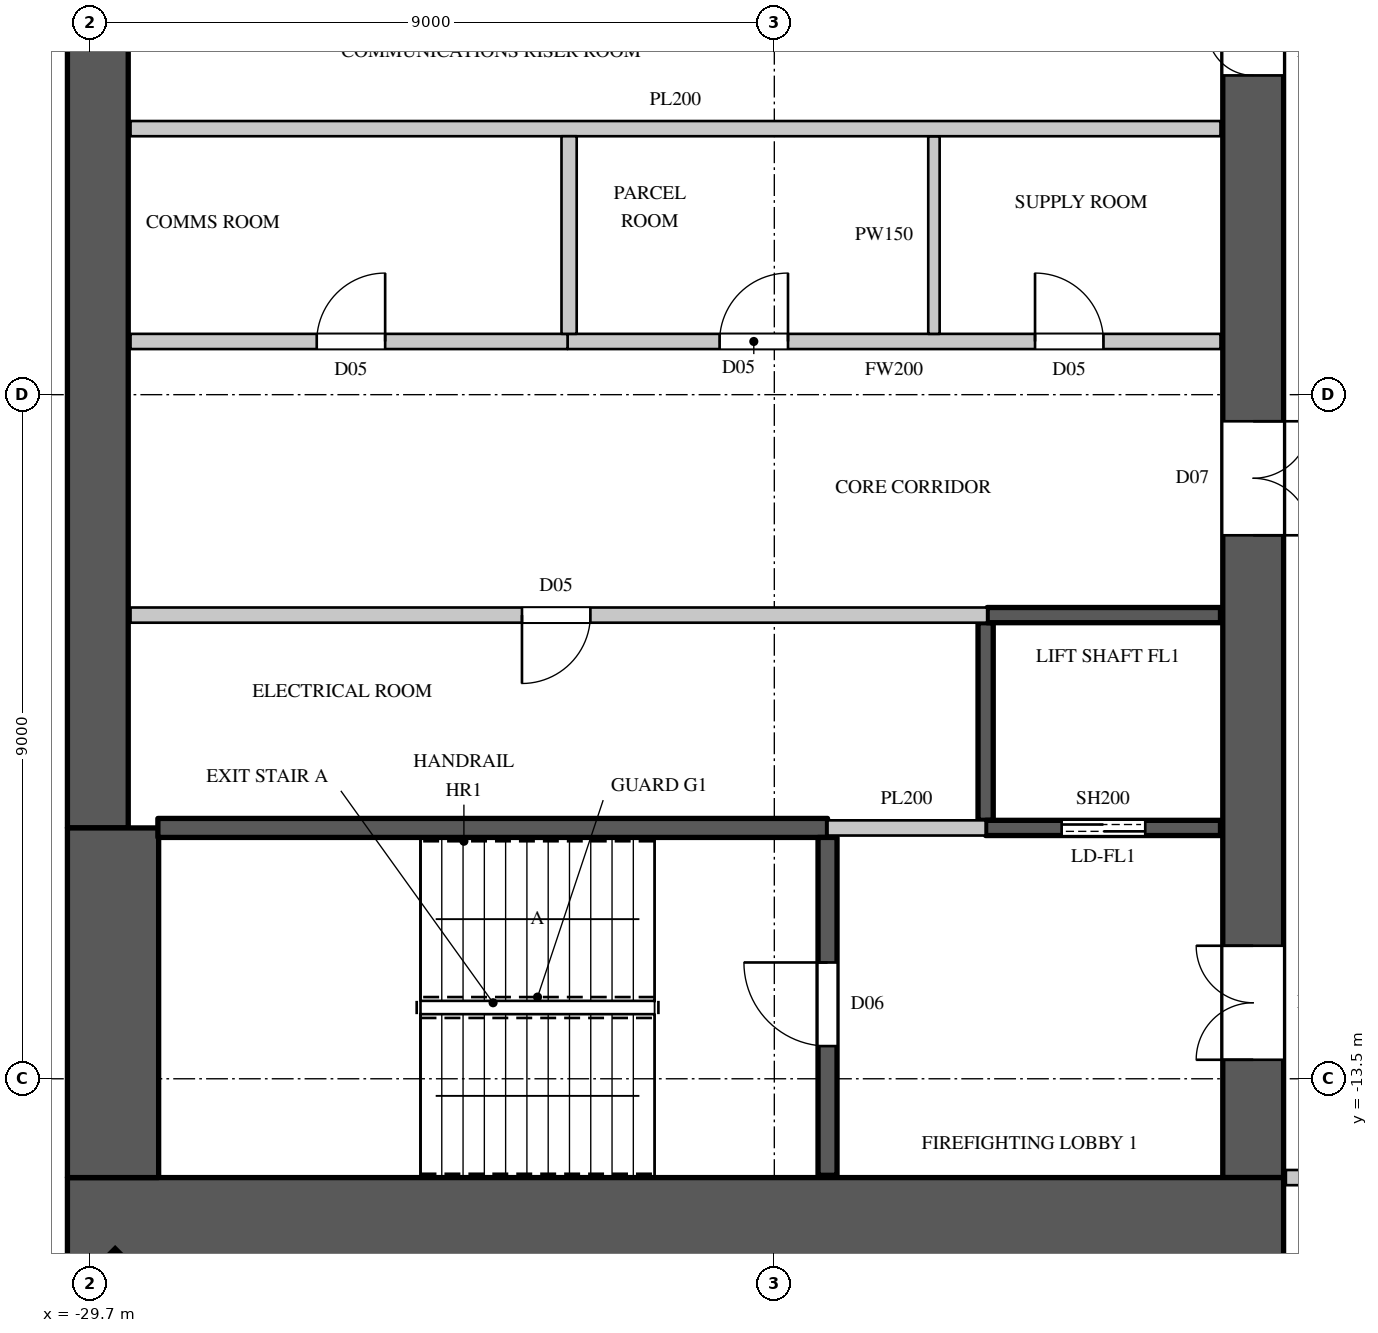
"""IFC4 building model, lengths in metres.
Left out: names, types, materials, properties, quantities, classifications, styles, units other than length and angle.
Written with IfcOpenShell. Run it as: python <this file> out.ifc"""

import sys

from ifc_helpers import new_model, si_unit, direction, frame, frame_2d, origin, origin_2d, place, context, subcontext, project, spatial, rectangle, extrude, element, fill, save


model = new_model("IFC4")
c1 = context("Model", 3, precision=1e-05, world=origin(), true_north=direction((0.0, 1.0)))
c2 = subcontext(c1, "Body", "Model", "MODEL_VIEW")
j1 = project(units=[si_unit("LENGTHUNIT", "METRE"), si_unit("PLANEANGLEUNIT", "RADIAN")], contexts=[c1])
p1 = place(None, origin())
s1 = spatial("IfcSite", under=j1, at=p1, CompositionType="ELEMENT")
p2 = place(p1, origin())
s2 = spatial("IfcBuilding", under=s1, at=p2, CompositionType="ELEMENT")
p3 = place(p2, frame((0.0, 0.0, 201.5)))
s3 = spatial("IfcBuildingStorey", under=s2, at=p3, CompositionType="ELEMENT", Elevation=201.5)
p4 = place(p3, frame((-29.443, -16.443, 0.0), z_axis=(0.0, 0.0, 1.0), x_axis=(0.707106781187, -0.707106781187, 0.0)))
e1 = element("IfcColumn", 1, at=p4, inside=s3, PredefinedType="COLUMN", context=c2, shape_type="SweptSolid", body=[
    extrude(rectangle(XDim=0.9, YDim=1.1, at=origin_2d()), origin(), (0.0, 0.0, 1.0), 4.1),
])
p5 = place(p3, frame((-30.0, -15.4, 0.0), z_axis=(0.0, 0.0, 1.0), x_axis=(1.0, 0.0, 0.0)))
e2 = element("IfcWall", 2, at=p5, inside=s3, PredefinedType="SHEAR", context=c2, shape_type="SweptSolid", body=[
    extrude(rectangle(XDim=16.0, YDim=1.2, at=frame_2d((8.0, 0.0))), origin(), (0.0, 0.0, 1.0), 4.1),
])
p6 = place(p3, frame((-14.4, -14.8, 0.0), z_axis=(0.0, 0.0, 1.0), x_axis=(0.0, 1.0, 0.0)))
e3 = element("IfcWall", 3, at=p6, inside=s3, PredefinedType="SHEAR", context=c2, shape_type="SweptSolid", body=[
    extrude(rectangle(XDim=29.6, YDim=0.8, at=frame_2d((14.8, 0.0))), origin(), (0.0, 0.0, 1.0), 4.1),
])
p7 = place(p6, frame((1.55, 0.0, 0.0)))
e4 = element("IfcOpeningElement", 4, at=p7, cuts=e3, PredefinedType="OPENING", context=c2, shape_type="SweptSolid", body=[
    extrude(rectangle(XDim=1.5, YDim=2.4, at=frame_2d((0.75, 1.2))), frame((0.0, 0.41, 0.0), z_axis=(0.0, -1.0, 0.0), x_axis=(1.0, 0.0, 0.0)), (0.0, 0.0, 1.0), 0.82),
])
p8 = place(p6, frame((26.55, 0.0, 0.0)))
e5 = element("IfcOpeningElement", 5, at=p8, cuts=e3, PredefinedType="OPENING", context=c2, shape_type="SweptSolid", body=[
    extrude(rectangle(XDim=1.5, YDim=2.4, at=frame_2d((0.75, 1.2))), frame((0.0, 0.41, 0.0), z_axis=(0.0, -1.0, 0.0), x_axis=(1.0, 0.0, 0.0)), (0.0, 0.0, 1.0), 0.82),
])
p9 = place(p6, frame((8.45, 0.0, 0.0)))
e6 = element("IfcOpeningElement", 6, at=p9, cuts=e3, PredefinedType="OPENING", context=c2, shape_type="SweptSolid", body=[
    extrude(rectangle(XDim=1.5, YDim=2.4, at=frame_2d((0.75, 1.2))), frame((0.0, 0.41, 0.0), z_axis=(0.0, -1.0, 0.0), x_axis=(1.0, 0.0, 0.0)), (0.0, 0.0, 1.0), 0.82),
])
p10 = place(p6, frame((19.65, 0.0, 0.0)))
e7 = element("IfcOpeningElement", 7, at=p10, cuts=e3, PredefinedType="OPENING", context=c2, shape_type="SweptSolid", body=[
    extrude(rectangle(XDim=1.5, YDim=2.4, at=frame_2d((0.75, 1.2))), frame((0.0, 0.41, 0.0), z_axis=(0.0, -1.0, 0.0), x_axis=(1.0, 0.0, 0.0)), (0.0, 0.0, 1.0), 0.82),
])
p11 = place(p6, frame((14.5, 0.0, 0.0)))
e8 = element("IfcOpeningElement", 8, at=p11, cuts=e3, PredefinedType="OPENING", context=c2, shape_type="SweptSolid", body=[
    extrude(rectangle(XDim=0.6, YDim=2.0, at=frame_2d((0.3, 1.0))), frame((0.0, 0.41, 0.0), z_axis=(0.0, -1.0, 0.0), x_axis=(1.0, 0.0, 0.0)), (0.0, 0.0, 1.0), 0.82),
])
p12 = place(p3, frame((-29.6, -10.2, 0.0), z_axis=(0.0, 0.0, 1.0), x_axis=(0.0, 1.0, 0.0)))
e9 = element("IfcWall", 9, at=p12, inside=s3, PredefinedType="SHEAR", context=c2, shape_type="SweptSolid", body=[
    extrude(rectangle(XDim=20.4, YDim=0.8, at=frame_2d((10.2, 0.0))), origin(), (0.0, 0.0, 1.0), 4.1),
])
p13 = place(p3, frame((-29.4, -14.8, 0.0), z_axis=(0.0, 0.0, 1.0), x_axis=(0.0, 1.0, 0.0)))
e10 = element("IfcWall", 10, at=p13, inside=s3, PredefinedType="SHEAR", context=c2, shape_type="SweptSolid", body=[
    extrude(rectangle(XDim=4.6, YDim=1.2, at=frame_2d((2.3, 0.0))), origin(), (0.0, 0.0, 1.0), 4.1),
])
p14 = place(p3, frame((-23.42, -3.8, 0.0), z_axis=(0.0, 0.0, 1.0), x_axis=(1.0, 0.0, 0.0)))
e11 = element("IfcWall", 11, at=p14, inside=s3, PredefinedType="PARTITIONING", context=c2, shape_type="SweptSolid", body=[
    extrude(rectangle(XDim=8.59, YDim=0.2, at=frame_2d((4.295, 0.0))), origin(), (0.0, 0.0, 1.0), 3.8),
])
p15 = place(p14, frame((2.0, 0.0, 0.0)))
e12 = element("IfcOpeningElement", 12, at=p15, cuts=e11, PredefinedType="OPENING", context=c2, shape_type="SweptSolid", body=[
    extrude(rectangle(XDim=0.9, YDim=2.2, at=frame_2d((0.45, 1.1))), frame((0.0, 0.11, 0.0), z_axis=(0.0, -1.0, 0.0), x_axis=(1.0, 0.0, 0.0)), (0.0, 0.0, 1.0), 0.22),
])
p16 = place(p14, frame((6.15, 0.0, 0.0)))
e13 = element("IfcOpeningElement", 13, at=p16, cuts=e11, PredefinedType="OPENING", context=c2, shape_type="SweptSolid", body=[
    extrude(rectangle(XDim=0.9, YDim=2.2, at=frame_2d((0.45, 1.1))), frame((0.0, 0.11, 0.0), z_axis=(0.0, -1.0, 0.0), x_axis=(1.0, 0.0, 0.0)), (0.0, 0.0, 1.0), 0.22),
])
p17 = place(p3, frame((-13.97, -14.8, 0.0), z_axis=(0.0, 0.0, 1.0), x_axis=(1.0, 0.0, 0.0)))
e14 = element("IfcWall", 14, at=p17, inside=s3, PredefinedType="PARTITIONING", context=c2, shape_type="SweptSolid", body=[
    extrude(rectangle(XDim=2.87, YDim=0.2, at=frame_2d((1.435, 0.0))), origin(), (0.0, 0.0, 1.0), 3.8),
])
p18 = place(p3, frame((-18.6, -3.7, 0.0), z_axis=(0.0, 0.0, 1.0), x_axis=(0.0, 1.0, 0.0)))
e15 = element("IfcWall", 15, at=p18, inside=s3, PredefinedType="PARTITIONING", context=c2, shape_type="SweptSolid", body=[
    extrude(rectangle(XDim=2.6, YDim=0.15, at=frame_2d((1.3, 0.0))), origin(), (0.0, 0.0, 1.0), 3.8),
])
p19 = place(p3, frame((-29.17, -7.4, 0.0), z_axis=(0.0, 0.0, 1.0), x_axis=(1.0, 0.0, 0.0)))
e16 = element("IfcWall", 16, at=p19, inside=s3, PredefinedType="PARTITIONING", context=c2, shape_type="SweptSolid", body=[
    extrude(rectangle(XDim=11.27, YDim=0.2, at=frame_2d((5.635, 0.0))), origin(), (0.0, 0.0, 1.0), 3.8),
])
p20 = place(p19, frame((5.15, 0.0, 0.0)))
e17 = element("IfcOpeningElement", 17, at=p20, cuts=e16, PredefinedType="OPENING", context=c2, shape_type="SweptSolid", body=[
    extrude(rectangle(XDim=0.9, YDim=2.2, at=frame_2d((0.45, 1.1))), frame((0.0, 0.11, 0.0), z_axis=(0.0, -1.0, 0.0), x_axis=(1.0, 0.0, 0.0)), (0.0, 0.0, 1.0), 0.22),
])
p21 = place(p3, frame((-29.17, -3.8, 0.0), z_axis=(0.0, 0.0, 1.0), x_axis=(1.0, 0.0, 0.0)))
e18 = element("IfcWall", 18, at=p21, inside=s3, PredefinedType="PARTITIONING", context=c2, shape_type="SweptSolid", body=[
    extrude(rectangle(XDim=5.75, YDim=0.2, at=frame_2d((2.875, 0.0))), origin(), (0.0, 0.0, 1.0), 3.8),
])
p22 = place(p21, frame((2.45, 0.0, 0.0)))
e19 = element("IfcOpeningElement", 19, at=p22, cuts=e18, PredefinedType="OPENING", context=c2, shape_type="SweptSolid", body=[
    extrude(rectangle(XDim=0.9, YDim=2.2, at=frame_2d((0.45, 1.1))), frame((0.0, 0.11, 0.0), z_axis=(0.0, -1.0, 0.0), x_axis=(1.0, 0.0, 0.0)), (0.0, 0.0, 1.0), 0.22),
])
p23 = place(p3, frame((-29.17, -1.0, 0.0), z_axis=(0.0, 0.0, 1.0), x_axis=(1.0, 0.0, 0.0)))
e20 = element("IfcWall", 20, at=p23, inside=s3, PredefinedType="PARTITIONING", context=c2, shape_type="SweptSolid", body=[
    extrude(rectangle(XDim=14.34, YDim=0.2, at=frame_2d((7.17, 0.0))), origin(), (0.0, 0.0, 1.0), 3.8),
])
p24 = place(p3, frame((-23.4, -3.7, 0.0), z_axis=(0.0, 0.0, 1.0), x_axis=(0.0, 1.0, 0.0)))
e21 = element("IfcWall", 21, at=p24, inside=s3, PredefinedType="PARTITIONING", context=c2, shape_type="SweptSolid", body=[
    extrude(rectangle(XDim=2.6, YDim=0.2, at=frame_2d((1.3, 0.0))), origin(), (0.0, 0.0, 1.0), 3.8),
])
p25 = place(p3, frame((-20.0, -10.2, 0.0), z_axis=(0.0, 0.0, 1.0), x_axis=(1.0, 0.0, 0.0)))
e22 = element("IfcWall", 22, at=p25, inside=s3, PredefinedType="PARTITIONING", context=c2, shape_type="SweptSolid", body=[
    extrude(rectangle(XDim=2.08, YDim=0.2, at=frame_2d((1.04, 0.0))), origin(), (0.0, 0.0, 1.0), 3.8),
])
p26 = place(p3, frame((-17.92, -10.1, 0.0), z_axis=(0.0, 0.0, 1.0), x_axis=(0.0, 1.0, 0.0)))
e23 = element("IfcWall", 23, at=p26, inside=s3, PredefinedType="SHEAR", context=c2, shape_type="SweptSolid", body=[
    extrude(rectangle(XDim=2.6, YDim=0.2, at=frame_2d((1.3, 0.0))), origin(), (0.0, 0.0, 1.0), 3.8),
])
p27 = place(p3, frame((-17.92, -10.2, 0.0), z_axis=(0.0, 0.0, 1.0), x_axis=(1.0, 0.0, 0.0)))
e24 = element("IfcWall", 24, at=p27, inside=s3, PredefinedType="SHEAR", context=c2, shape_type="SweptSolid", body=[
    extrude(rectangle(XDim=3.09, YDim=0.2, at=frame_2d((1.545, 0.0))), origin(), (0.0, 0.0, 1.0), 3.8),
])
p28 = place(p27, frame((1.0, 0.0, 0.0)))
e25 = element("IfcOpeningElement", 25, at=p28, cuts=e24, PredefinedType="OPENING", context=c2, shape_type="SweptSolid", body=[
    extrude(rectangle(XDim=1.1, YDim=2.2, at=frame_2d((0.55, 1.1))), frame((0.0, 0.11, 0.0), z_axis=(0.0, -1.0, 0.0), x_axis=(1.0, 0.0, 0.0)), (0.0, 0.0, 1.0), 0.22),
])
p29 = place(p3, frame((-17.9, -7.4, 0.0), z_axis=(0.0, 0.0, 1.0), x_axis=(1.0, 0.0, 0.0)))
e26 = element("IfcWall", 26, at=p29, inside=s3, PredefinedType="SHEAR", context=c2, shape_type="SweptSolid", body=[
    extrude(rectangle(XDim=3.07, YDim=0.2, at=frame_2d((1.535, 0.0))), origin(), (0.0, 0.0, 1.0), 3.8),
])
p30 = place(p3, frame((-28.81, -10.2, 0.0), z_axis=(0.0, 0.0, 1.0), x_axis=(1.0, 0.0, 0.0)))
e27 = element("IfcWall", 27, at=p30, inside=s3, PredefinedType="SHEAR", context=c2, shape_type="SweptSolid", body=[
    extrude(rectangle(XDim=8.81, YDim=0.25, at=frame_2d((4.405, 0.0))), origin(), (0.0, 0.0, 1.0), 3.8),
])
p31 = place(p3, frame((-20.0, -14.77, 0.0), z_axis=(0.0, 0.0, 1.0), x_axis=(0.0, 1.0, 0.0)))
e28 = element("IfcWall", 28, at=p31, inside=s3, PredefinedType="SHEAR", context=c2, shape_type="SweptSolid", body=[
    extrude(rectangle(XDim=4.445, YDim=0.25, at=frame_2d((2.223, 0.0))), origin(), (0.0, 0.0, 1.0), 3.8),
])
p32 = place(p31, frame((1.7, 0.0, 0.0)))
e29 = element("IfcOpeningElement", 29, at=p32, cuts=e28, PredefinedType="OPENING", context=c2, shape_type="SweptSolid", body=[
    extrude(rectangle(XDim=1.1, YDim=2.2, at=frame_2d((0.55, 1.1))), frame((0.0, 0.135, 0.0), z_axis=(0.0, -1.0, 0.0), x_axis=(1.0, 0.0, 0.0)), (0.0, 0.0, 1.0), 0.27),
])
p33 = place(p32, origin())
e30 = element("IfcDoor", 30, at=p33, inside=s3, OperationType="SINGLE_SWING_RIGHT", PredefinedType="DOOR", context=c2, shape_type="SweptSolid", body=[
    extrude(rectangle(XDim=1.1, YDim=2.2, at=frame_2d((0.55, 1.1))), frame((0.0, 0.025, 0.0), z_axis=(0.0, -1.0, 0.0), x_axis=(1.0, 0.0, 0.0)), (0.0, 0.0, 1.0), 0.05),
])
fill(e29, e30)
p34 = place(p20, origin())
e31 = element("IfcDoor", 31, at=p34, inside=s3, OperationType="SINGLE_SWING_RIGHT", PredefinedType="DOOR", context=c2, shape_type="SweptSolid", body=[
    extrude(rectangle(XDim=0.9, YDim=2.2, at=frame_2d((0.45, 1.1))), frame((0.0, 0.025, 0.0), z_axis=(0.0, -1.0, 0.0), x_axis=(1.0, 0.0, 0.0)), (0.0, 0.0, 1.0), 0.05),
])
fill(e17, e31)
p35 = place(p22, origin())
e32 = element("IfcDoor", 32, at=p35, inside=s3, OperationType="SINGLE_SWING_RIGHT", PredefinedType="DOOR", context=c2, shape_type="SweptSolid", body=[
    extrude(rectangle(XDim=0.9, YDim=2.2, at=frame_2d((0.45, 1.1))), frame((0.0, 0.025, 0.0), z_axis=(0.0, -1.0, 0.0), x_axis=(1.0, 0.0, 0.0)), (0.0, 0.0, 1.0), 0.05),
])
fill(e19, e32)
p36 = place(p15, origin())
e33 = element("IfcDoor", 33, at=p36, inside=s3, OperationType="SINGLE_SWING_RIGHT", PredefinedType="DOOR", context=c2, shape_type="SweptSolid", body=[
    extrude(rectangle(XDim=0.9, YDim=2.2, at=frame_2d((0.45, 1.1))), frame((0.0, 0.025, 0.0), z_axis=(0.0, -1.0, 0.0), x_axis=(1.0, 0.0, 0.0)), (0.0, 0.0, 1.0), 0.05),
])
fill(e12, e33)
p37 = place(p16, origin())
e34 = element("IfcDoor", 34, at=p37, inside=s3, OperationType="SINGLE_SWING_LEFT", PredefinedType="DOOR", context=c2, shape_type="SweptSolid", body=[
    extrude(rectangle(XDim=0.9, YDim=2.2, at=frame_2d((0.45, 1.1))), frame((0.0, 0.025, 0.0), z_axis=(0.0, -1.0, 0.0), x_axis=(1.0, 0.0, 0.0)), (0.0, 0.0, 1.0), 0.05),
])
fill(e13, e34)
p38 = place(p28, origin())
e35 = element("IfcDoor", 35, at=p38, inside=s3, OperationType="DOUBLE_DOOR_SLIDING", PredefinedType="DOOR", context=c2, shape_type="SweptSolid", body=[
    extrude(rectangle(XDim=1.1, YDim=2.2, at=frame_2d((0.55, 1.1))), frame((0.0, 0.025, 0.0), z_axis=(0.0, -1.0, 0.0), x_axis=(1.0, 0.0, 0.0)), (0.0, 0.0, 1.0), 0.05),
])
fill(e25, e35)
p39 = place(p7, origin())
e36 = element("IfcDoor", 36, at=p39, inside=s3, OperationType="DOUBLE_DOOR_SINGLE_SWING", PredefinedType="DOOR", context=c2, shape_type="SweptSolid", body=[
    extrude(rectangle(XDim=1.5, YDim=2.4, at=frame_2d((0.75, 1.2))), frame((0.0, 0.395, 0.0), z_axis=(0.0, -1.0, 0.0), x_axis=(1.0, 0.0, 0.0)), (0.0, 0.0, 1.0), 0.05),
])
fill(e4, e36)
p40 = place(p9, origin())
e37 = element("IfcDoor", 37, at=p40, inside=s3, OperationType="DOUBLE_DOOR_SINGLE_SWING", PredefinedType="DOOR", context=c2, shape_type="SweptSolid", body=[
    extrude(rectangle(XDim=1.5, YDim=2.4, at=frame_2d((0.75, 1.2))), frame((0.0, -0.345, 0.0), z_axis=(0.0, -1.0, 0.0), x_axis=(1.0, 0.0, 0.0)), (0.0, 0.0, 1.0), 0.05),
])
fill(e6, e37)
p41 = place(p11, origin())
e38 = element("IfcDoor", 38, at=p41, inside=s3, OperationType="SINGLE_SWING_RIGHT", PredefinedType="DOOR", context=c2, shape_type="SweptSolid", body=[
    extrude(rectangle(XDim=0.6, YDim=2.0, at=frame_2d((0.3, 1.0))), frame((0.0, 0.395, 0.0), z_axis=(0.0, -1.0, 0.0), x_axis=(1.0, 0.0, 0.0)), (0.0, 0.0, 1.0), 0.05),
])
fill(e8, e38)
save(model, sys.argv[1])
